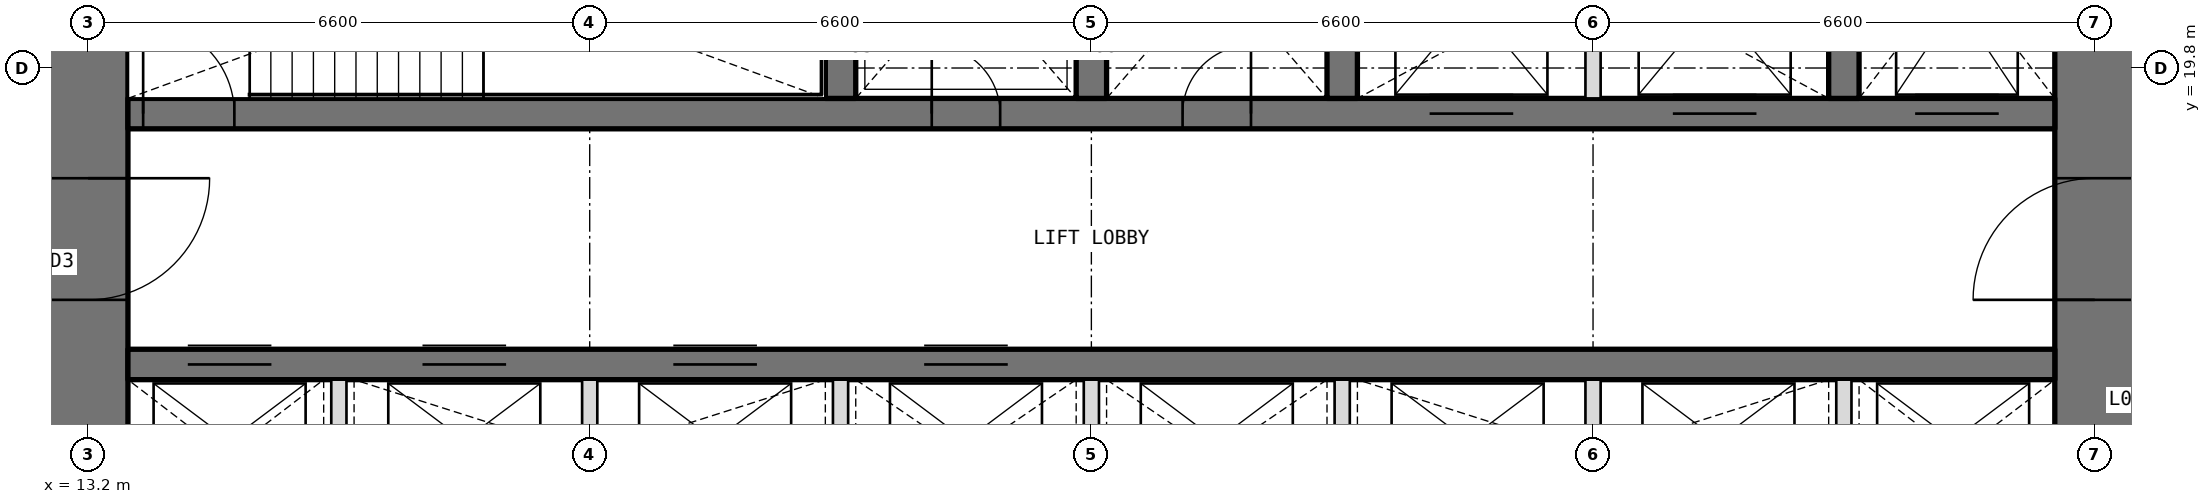
"""IFC4 building model, lengths in metres.
Left out: names, types, materials, properties, quantities, classifications, styles, units other than length and angle.
Written with IfcOpenShell. Run it as: python <this file> out.ifc"""

import sys

from ifc_helpers import new_model, si_unit, direction, frame, frame_2d, origin, place, context, subcontext, project, spatial, rectangle, extrude, element, fill, save


model = new_model("IFC4")
c1 = context("Model", 3, precision=1e-05, world=origin(), true_north=direction((0.0, 1.0)))
c2 = subcontext(c1, "Body", "Model", "MODEL_VIEW")
j1 = project(units=[si_unit("LENGTHUNIT", "METRE"), si_unit("PLANEANGLEUNIT", "RADIAN")], contexts=[c1])
p1 = place(None, origin())
s1 = spatial("IfcSite", under=j1, at=p1, CompositionType="ELEMENT")
p2 = place(p1, origin())
s2 = spatial("IfcBuilding", under=s1, at=p2, CompositionType="ELEMENT")
p3 = place(p2, frame((0.0, 0.0, 21.3)))
s3 = spatial("IfcBuildingStorey", under=s2, at=p3, CompositionType="ELEMENT", Elevation=21.3)
p4 = place(p3, frame((39.6, 13.725, 0.0), z_axis=(0.0, 0.0, 1.0), x_axis=(0.0, 1.0, 0.0)))
e1 = element("IfcWall", 1, at=p4, inside=s3, PredefinedType="SHEAR", context=c2, shape_type="SweptSolid", body=[
    extrude(rectangle(XDim=18.75, YDim=1.05, at=frame_2d((9.375, 0.0))), origin(), (0.0, 0.0, 1.0), 4.2),
])
p5 = place(p4, frame((3.025, 0.0, 0.0)))
e2 = element("IfcOpeningElement", 2, at=p5, cuts=e1, PredefinedType="OPENING", context=c2, shape_type="SweptSolid", body=[
    extrude(rectangle(XDim=1.6, YDim=2.1, at=frame_2d((0.8, 1.05))), frame((0.0, 0.535, 0.0), z_axis=(0.0, -1.0, 0.0), x_axis=(1.0, 0.0, 0.0)), (0.0, 0.0, 1.0), 1.07),
])
p6 = place(p4, frame((13.825, 0.0, 0.0)))
e3 = element("IfcOpeningElement", 3, at=p6, cuts=e1, PredefinedType="OPENING", context=c2, shape_type="SweptSolid", body=[
    extrude(rectangle(XDim=1.6, YDim=2.1, at=frame_2d((0.8, 1.05))), frame((0.0, 0.535, 0.0), z_axis=(0.0, -1.0, 0.0), x_axis=(1.0, 0.0, 0.0)), (0.0, 0.0, 1.0), 1.07),
])
p7 = place(p3, frame((13.2, 32.475, 0.0), z_axis=(0.0, 0.0, 1.0), x_axis=(0.0, -1.0, 0.0)))
e4 = element("IfcWall", 4, at=p7, inside=s3, PredefinedType="SHEAR", context=c2, shape_type="SweptSolid", body=[
    extrude(rectangle(XDim=18.75, YDim=1.05, at=frame_2d((9.375, 0.0))), origin(), (0.0, 0.0, 1.0), 4.2),
])
p8 = place(p7, frame((14.125, 0.0, 0.0)))
e5 = element("IfcOpeningElement", 5, at=p8, cuts=e4, PredefinedType="OPENING", context=c2, shape_type="SweptSolid", body=[
    extrude(rectangle(XDim=1.6, YDim=2.1, at=frame_2d((0.8, 1.05))), frame((0.0, 0.535, 0.0), z_axis=(0.0, -1.0, 0.0), x_axis=(1.0, 0.0, 0.0)), (0.0, 0.0, 1.0), 1.07),
])
p9 = place(p7, frame((3.325, 0.0, 0.0)))
e6 = element("IfcOpeningElement", 6, at=p9, cuts=e4, PredefinedType="OPENING", context=c2, shape_type="SweptSolid", body=[
    extrude(rectangle(XDim=1.6, YDim=2.1, at=frame_2d((0.8, 1.05))), frame((0.0, 0.535, 0.0), z_axis=(0.0, -1.0, 0.0), x_axis=(1.0, 0.0, 0.0)), (0.0, 0.0, 1.0), 1.07),
])
p10 = place(p3, frame((13.725, 15.9, 0.0), z_axis=(0.0, 0.0, 1.0), x_axis=(1.0, 0.0, 0.0)))
e7 = element("IfcWall", 7, at=p10, inside=s3, PredefinedType="SHEAR", context=c2, shape_type="SweptSolid", body=[
    extrude(rectangle(XDim=25.35, YDim=0.4, at=frame_2d((12.675, 0.0))), origin(), (0.0, 0.0, 1.0), 4.2),
])
p11 = place(p10, frame((0.788, 0.0, 0.0)))
e8 = element("IfcOpeningElement", 8, at=p11, cuts=e7, PredefinedType="OPENING", context=c2, shape_type="SweptSolid", body=[
    extrude(rectangle(XDim=1.1, YDim=2.1, at=frame_2d((0.55, 1.05))), frame((0.0, 0.21, 0.0), z_axis=(0.0, -1.0, 0.0), x_axis=(1.0, 0.0, 0.0)), (0.0, 0.0, 1.0), 0.42),
])
p12 = place(p10, frame((3.875, 0.0, 0.0)))
e9 = element("IfcOpeningElement", 9, at=p12, cuts=e7, PredefinedType="OPENING", context=c2, shape_type="SweptSolid", body=[
    extrude(rectangle(XDim=1.1, YDim=2.1, at=frame_2d((0.55, 1.05))), frame((0.0, 0.21, 0.0), z_axis=(0.0, -1.0, 0.0), x_axis=(1.0, 0.0, 0.0)), (0.0, 0.0, 1.0), 0.42),
])
p13 = place(p10, frame((7.175, 0.0, 0.0)))
e10 = element("IfcOpeningElement", 10, at=p13, cuts=e7, PredefinedType="OPENING", context=c2, shape_type="SweptSolid", body=[
    extrude(rectangle(XDim=1.1, YDim=2.1, at=frame_2d((0.55, 1.05))), frame((0.0, 0.21, 0.0), z_axis=(0.0, -1.0, 0.0), x_axis=(1.0, 0.0, 0.0)), (0.0, 0.0, 1.0), 0.42),
])
p14 = place(p10, frame((10.475, 0.0, 0.0)))
e11 = element("IfcOpeningElement", 11, at=p14, cuts=e7, PredefinedType="OPENING", context=c2, shape_type="SweptSolid", body=[
    extrude(rectangle(XDim=1.1, YDim=2.1, at=frame_2d((0.55, 1.05))), frame((0.0, 0.21, 0.0), z_axis=(0.0, -1.0, 0.0), x_axis=(1.0, 0.0, 0.0)), (0.0, 0.0, 1.0), 0.42),
])
p15 = place(p3, frame((13.725, 19.2, 0.0), z_axis=(0.0, 0.0, 1.0), x_axis=(1.0, 0.0, 0.0)))
e12 = element("IfcWall", 12, at=p15, inside=s3, PredefinedType="SHEAR", context=c2, shape_type="SweptSolid", body=[
    extrude(rectangle(XDim=25.35, YDim=0.4, at=frame_2d((12.675, 0.0))), origin(), (0.0, 0.0, 1.0), 4.2),
])
p16 = place(p15, frame((10.575, 0.0, 0.0)))
e13 = element("IfcOpeningElement", 13, at=p16, cuts=e12, PredefinedType="OPENING", context=c2, shape_type="SweptSolid", body=[
    extrude(rectangle(XDim=0.9, YDim=2.1, at=frame_2d((0.45, 1.05))), frame((0.0, 0.21, 0.0), z_axis=(0.0, -1.0, 0.0), x_axis=(1.0, 0.0, 0.0)), (0.0, 0.0, 1.0), 0.42),
])
p17 = place(p15, frame((13.875, 0.0, 0.0)))
e14 = element("IfcOpeningElement", 14, at=p17, cuts=e12, PredefinedType="OPENING", context=c2, shape_type="SweptSolid", body=[
    extrude(rectangle(XDim=0.9, YDim=2.1, at=frame_2d((0.45, 1.05))), frame((0.0, 0.21, 0.0), z_axis=(0.0, -1.0, 0.0), x_axis=(1.0, 0.0, 0.0)), (0.0, 0.0, 1.0), 0.42),
])
p18 = place(p15, frame((0.2, 0.0, 0.0)))
e15 = element("IfcOpeningElement", 15, at=p18, cuts=e12, PredefinedType="OPENING", context=c2, shape_type="SweptSolid", body=[
    extrude(rectangle(XDim=1.2, YDim=2.1, at=frame_2d((0.6, 1.05))), frame((0.0, 0.21, 0.0), z_axis=(0.0, -1.0, 0.0), x_axis=(1.0, 0.0, 0.0)), (0.0, 0.0, 1.0), 0.42),
])
p19 = place(p15, frame((23.512, 0.0, 0.0)))
e16 = element("IfcOpeningElement", 16, at=p19, cuts=e12, PredefinedType="OPENING", context=c2, shape_type="SweptSolid", body=[
    extrude(rectangle(XDim=1.1, YDim=2.1, at=frame_2d((0.55, 1.05))), frame((0.0, 0.21, 0.0), z_axis=(0.0, -1.0, 0.0), x_axis=(1.0, 0.0, 0.0)), (0.0, 0.0, 1.0), 0.42),
])
p20 = place(p15, frame((17.125, 0.0, 0.0)))
e17 = element("IfcOpeningElement", 17, at=p20, cuts=e12, PredefinedType="OPENING", context=c2, shape_type="SweptSolid", body=[
    extrude(rectangle(XDim=1.1, YDim=2.1, at=frame_2d((0.55, 1.05))), frame((0.0, 0.21, 0.0), z_axis=(0.0, -1.0, 0.0), x_axis=(1.0, 0.0, 0.0)), (0.0, 0.0, 1.0), 0.42),
])
p21 = place(p15, frame((20.325, 0.0, 0.0)))
e18 = element("IfcOpeningElement", 18, at=p21, cuts=e12, PredefinedType="OPENING", context=c2, shape_type="SweptSolid", body=[
    extrude(rectangle(XDim=1.1, YDim=2.1, at=frame_2d((0.55, 1.05))), frame((0.0, 0.21, 0.0), z_axis=(0.0, -1.0, 0.0), x_axis=(1.0, 0.0, 0.0)), (0.0, 0.0, 1.0), 0.42),
])
for number, where, z_axis, x_axis in (
    (19, (23.1, 19.4, 0.0), (0.0, 0.0, 1.0), (0.0, 1.0, 0.0)),
    (20, (26.4, 19.4, 0.0), (0.0, 0.0, 1.0), (0.0, 1.0, 0.0)),
    (21, (29.7, 19.4, 0.0), (0.0, 0.0, 1.0), (0.0, 1.0, 0.0)),
    (22, (36.3, 19.4, 0.0), (0.0, 0.0, 1.0), (0.0, 1.0, 0.0)),
):
    element("IfcWall", number, at=place(p3, frame(where, z_axis=z_axis, x_axis=x_axis)), inside=s3, PredefinedType="SHEAR", context=c2, shape_type="SweptSolid", body=[
        extrude(rectangle(XDim=3.35, YDim=0.4, at=frame_2d((1.675, 0.0))), origin(), (0.0, 0.0, 1.0), 4.2),
    ])
for number, where, z_axis, x_axis in (
    (23, (16.5, 13.725, 0.0), (0.0, 0.0, 1.0), (0.0, 1.0, 0.0)),
    (24, (19.8, 13.725, 0.0), (0.0, 0.0, 1.0), (0.0, 1.0, 0.0)),
    (25, (23.1, 13.725, 0.0), (0.0, 0.0, 1.0), (0.0, 1.0, 0.0)),
    (26, (26.4, 13.725, 0.0), (0.0, 0.0, 1.0), (0.0, 1.0, 0.0)),
    (27, (29.7, 13.725, 0.0), (0.0, 0.0, 1.0), (0.0, 1.0, 0.0)),
    (28, (33.0, 13.725, 0.0), (0.0, 0.0, 1.0), (0.0, 1.0, 0.0)),
    (29, (36.3, 13.725, 0.0), (0.0, 0.0, 1.0), (0.0, 1.0, 0.0)),
):
    element("IfcWall", number, at=place(p3, frame(where, z_axis=z_axis, x_axis=x_axis)), inside=s3, PredefinedType="PARTITIONING", context=c2, shape_type="SweptSolid", body=[
        extrude(rectangle(XDim=1.975, YDim=0.2, at=frame_2d((0.987, 0.0))), origin(), (0.0, 0.0, 1.0), 4.2),
    ])
p22 = place(p3, frame((33.0, 19.4, 0.0), z_axis=(0.0, 0.0, 1.0), x_axis=(0.0, 1.0, 0.0)))
e30 = element("IfcWall", 30, at=p22, inside=s3, PredefinedType="PARTITIONING", context=c2, shape_type="SweptSolid", body=[
    extrude(rectangle(XDim=3.35, YDim=0.2, at=frame_2d((1.675, 0.0))), origin(), (0.0, 0.0, 1.0), 4.2),
])
p23 = place(p16, origin())
e31 = element("IfcDoor", 31, at=p23, inside=s3, OperationType="SINGLE_SWING_LEFT", PredefinedType="DOOR", context=c2, shape_type="SweptSolid", body=[
    extrude(rectangle(XDim=0.9, YDim=2.1, at=frame_2d((0.45, 1.05))), frame((0.0, 0.025, 0.0), z_axis=(0.0, -1.0, 0.0), x_axis=(1.0, 0.0, 0.0)), (0.0, 0.0, 1.0), 0.05),
])
fill(e13, e31)
p24 = place(p17, origin())
e32 = element("IfcDoor", 32, at=p24, inside=s3, OperationType="SINGLE_SWING_RIGHT", PredefinedType="DOOR", context=c2, shape_type="SweptSolid", body=[
    extrude(rectangle(XDim=0.9, YDim=2.1, at=frame_2d((0.45, 1.05))), frame((0.0, 0.025, 0.0), z_axis=(0.0, -1.0, 0.0), x_axis=(1.0, 0.0, 0.0)), (0.0, 0.0, 1.0), 0.05),
])
fill(e14, e32)
p25 = place(p18, origin())
e33 = element("IfcDoor", 33, at=p25, inside=s3, OperationType="SINGLE_SWING_LEFT", PredefinedType="DOOR", context=c2, shape_type="SweptSolid", body=[
    extrude(rectangle(XDim=1.2, YDim=2.1, at=frame_2d((0.6, 1.05))), frame((0.0, 0.025, 0.0), z_axis=(0.0, -1.0, 0.0), x_axis=(1.0, 0.0, 0.0)), (0.0, 0.0, 1.0), 0.05),
])
fill(e15, e33)
p26 = place(p8, origin())
e34 = element("IfcDoor", 34, at=p26, inside=s3, OperationType="DOUBLE_DOOR_DOUBLE_SWING", PredefinedType="DOOR", context=c2, shape_type="SweptSolid", body=[
    extrude(rectangle(XDim=1.6, YDim=2.1, at=frame_2d((0.8, 1.05))), frame((0.0, 0.025, 0.0), z_axis=(0.0, -1.0, 0.0), x_axis=(1.0, 0.0, 0.0)), (0.0, 0.0, 1.0), 0.05),
])
fill(e5, e34)
p27 = place(p5, origin())
e35 = element("IfcDoor", 35, at=p27, inside=s3, OperationType="DOUBLE_DOOR_DOUBLE_SWING", PredefinedType="DOOR", context=c2, shape_type="SweptSolid", body=[
    extrude(rectangle(XDim=1.6, YDim=2.1, at=frame_2d((0.8, 1.05))), frame((0.0, 0.025, 0.0), z_axis=(0.0, -1.0, 0.0), x_axis=(1.0, 0.0, 0.0)), (0.0, 0.0, 1.0), 0.05),
])
fill(e2, e35)
p28 = place(p11, origin())
e36 = element("IfcDoor", 36, at=p28, inside=s3, OperationType="DOUBLE_DOOR_SLIDING", PredefinedType="DOOR", context=c2, shape_type="SweptSolid", body=[
    extrude(rectangle(XDim=1.1, YDim=2.1, at=frame_2d((0.55, 1.05))), frame((0.0, 0.025, 0.0), z_axis=(0.0, -1.0, 0.0), x_axis=(1.0, 0.0, 0.0)), (0.0, 0.0, 1.0), 0.05),
])
fill(e8, e36)
p29 = place(p12, origin())
e37 = element("IfcDoor", 37, at=p29, inside=s3, OperationType="DOUBLE_DOOR_SLIDING", PredefinedType="DOOR", context=c2, shape_type="SweptSolid", body=[
    extrude(rectangle(XDim=1.1, YDim=2.1, at=frame_2d((0.55, 1.05))), frame((0.0, 0.025, 0.0), z_axis=(0.0, -1.0, 0.0), x_axis=(1.0, 0.0, 0.0)), (0.0, 0.0, 1.0), 0.05),
])
fill(e9, e37)
p30 = place(p13, origin())
e38 = element("IfcDoor", 38, at=p30, inside=s3, OperationType="DOUBLE_DOOR_SLIDING", PredefinedType="DOOR", context=c2, shape_type="SweptSolid", body=[
    extrude(rectangle(XDim=1.1, YDim=2.1, at=frame_2d((0.55, 1.05))), frame((0.0, 0.025, 0.0), z_axis=(0.0, -1.0, 0.0), x_axis=(1.0, 0.0, 0.0)), (0.0, 0.0, 1.0), 0.05),
])
fill(e10, e38)
p31 = place(p14, origin())
e39 = element("IfcDoor", 39, at=p31, inside=s3, OperationType="DOUBLE_DOOR_SLIDING", PredefinedType="DOOR", context=c2, shape_type="SweptSolid", body=[
    extrude(rectangle(XDim=1.1, YDim=2.1, at=frame_2d((0.55, 1.05))), frame((0.0, 0.025, 0.0), z_axis=(0.0, -1.0, 0.0), x_axis=(1.0, 0.0, 0.0)), (0.0, 0.0, 1.0), 0.05),
])
fill(e11, e39)
p32 = place(p19, origin())
e40 = element("IfcDoor", 40, at=p32, inside=s3, OperationType="DOUBLE_DOOR_SLIDING", PredefinedType="DOOR", context=c2, shape_type="SweptSolid", body=[
    extrude(rectangle(XDim=1.1, YDim=2.1, at=frame_2d((0.55, 1.05))), frame((0.0, 0.025, 0.0), z_axis=(0.0, -1.0, 0.0), x_axis=(1.0, 0.0, 0.0)), (0.0, 0.0, 1.0), 0.05),
])
fill(e16, e40)
p33 = place(p20, origin())
e41 = element("IfcDoor", 41, at=p33, inside=s3, OperationType="DOUBLE_DOOR_SLIDING", PredefinedType="DOOR", context=c2, shape_type="SweptSolid", body=[
    extrude(rectangle(XDim=1.1, YDim=2.1, at=frame_2d((0.55, 1.05))), frame((0.0, 0.025, 0.0), z_axis=(0.0, -1.0, 0.0), x_axis=(1.0, 0.0, 0.0)), (0.0, 0.0, 1.0), 0.05),
])
fill(e17, e41)
p34 = place(p21, origin())
e42 = element("IfcDoor", 42, at=p34, inside=s3, OperationType="DOUBLE_DOOR_SLIDING", PredefinedType="DOOR", context=c2, shape_type="SweptSolid", body=[
    extrude(rectangle(XDim=1.1, YDim=2.1, at=frame_2d((0.55, 1.05))), frame((0.0, 0.025, 0.0), z_axis=(0.0, -1.0, 0.0), x_axis=(1.0, 0.0, 0.0)), (0.0, 0.0, 1.0), 0.05),
])
fill(e18, e42)
save(model, sys.argv[1])
